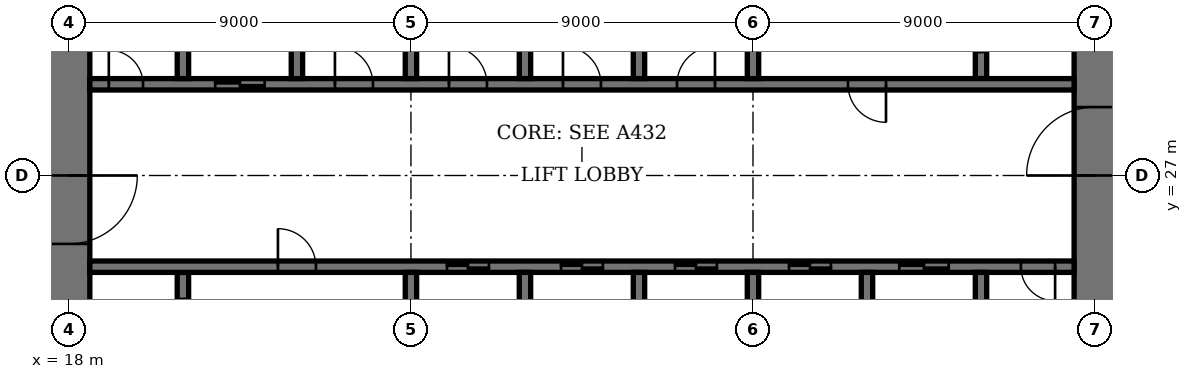
"""IFC4 building model, lengths in metres.
Left out: names, types, materials, properties, quantities, classifications, styles, units other than length and angle.
Written with IfcOpenShell. Run it as: python <this file> out.ifc"""

import sys

from ifc_helpers import new_model, si_unit, direction, frame, frame_2d, origin, place, context, subcontext, project, spatial, rectangle, extrude, element, fill, save


model = new_model("IFC4")
c1 = context("Model", 3, precision=1e-05, world=origin(), true_north=direction((0.0, 1.0)))
c2 = subcontext(c1, "Body", "Model", "MODEL_VIEW")
j1 = project(units=[si_unit("LENGTHUNIT", "METRE"), si_unit("PLANEANGLEUNIT", "RADIAN")], contexts=[c1])
p1 = place(None, origin())
s1 = spatial("IfcSite", under=j1, at=p1, CompositionType="ELEMENT")
p2 = place(p1, origin())
s2 = spatial("IfcBuilding", under=s1, at=p2, CompositionType="ELEMENT")
p3 = place(p2, frame((0.0, 0.0, 275.4)))
s3 = spatial("IfcBuildingStorey", under=s2, at=p3, CompositionType="ELEMENT", Elevation=275.4)
p4 = place(p3, frame((18.0, 35.45, 0.0), z_axis=(0.0, 0.0, 1.0), x_axis=(0.0, -1.0, 0.0)))
e1 = element("IfcWall", 1, at=p4, inside=s3, PredefinedType="SHEAR", context=c2, shape_type="SweptSolid", body=[
    extrude(rectangle(XDim=16.9, YDim=1.1, at=frame_2d((8.45, 0.0))), origin(), (0.0, 0.0, 1.0), 4.0),
])
p5 = place(p4, frame((8.45, 0.0, 0.0)))
e2 = element("IfcOpeningElement", 2, at=p5, cuts=e1, PredefinedType="OPENING", context=c2, shape_type="SweptSolid", body=[
    extrude(rectangle(XDim=1.8, YDim=2.4, at=frame_2d((0.9, 1.2))), frame((0.0, 0.56, 0.0), z_axis=(0.0, -1.0, 0.0), x_axis=(1.0, 0.0, 0.0)), (0.0, 0.0, 1.0), 1.12),
])
p6 = place(p3, frame((45.0, 18.55, 0.0), z_axis=(0.0, 0.0, 1.0), x_axis=(0.0, 1.0, 0.0)))
e3 = element("IfcWall", 3, at=p6, inside=s3, PredefinedType="SHEAR", context=c2, shape_type="SweptSolid", body=[
    extrude(rectangle(XDim=16.9, YDim=1.1, at=frame_2d((8.45, 0.0))), origin(), (0.0, 0.0, 1.0), 4.0),
])
p7 = place(p6, frame((8.45, 0.0, 0.0)))
e4 = element("IfcOpeningElement", 4, at=p7, cuts=e3, PredefinedType="OPENING", context=c2, shape_type="SweptSolid", body=[
    extrude(rectangle(XDim=1.8, YDim=2.4, at=frame_2d((0.9, 1.2))), frame((0.0, 0.56, 0.0), z_axis=(0.0, -1.0, 0.0), x_axis=(1.0, 0.0, 0.0)), (0.0, 0.0, 1.0), 1.12),
])
p8 = place(p3, frame((21.0, 21.95, 0.0), z_axis=(0.0, 0.0, 1.0), x_axis=(0.0, 1.0, 0.0)))
e5 = element("IfcWall", 5, at=p8, inside=s3, PredefinedType="SHEAR", context=c2, shape_type="SweptSolid", body=[
    extrude(rectangle(XDim=2.5, YDim=0.3, at=frame_2d((1.25, 0.0))), origin(), (0.0, 0.0, 1.0), 4.0),
])
p9 = place(p8, frame((0.7, 0.0, 0.0)))
e6 = element("IfcOpeningElement", 6, at=p9, cuts=e5, PredefinedType="OPENING", context=c2, shape_type="SweptSolid", body=[
    extrude(rectangle(XDim=1.1, YDim=2.4, at=frame_2d((0.55, 1.2))), frame((0.0, 0.16, 0.0), z_axis=(0.0, -1.0, 0.0), x_axis=(1.0, 0.0, 0.0)), (0.0, 0.0, 1.0), 0.32),
])
p10 = place(p3, frame((42.0, 29.55, 0.0), z_axis=(0.0, 0.0, 1.0), x_axis=(0.0, 1.0, 0.0)))
e7 = element("IfcWall", 7, at=p10, inside=s3, PredefinedType="SHEAR", context=c2, shape_type="SweptSolid", body=[
    extrude(rectangle(XDim=2.5, YDim=0.3, at=frame_2d((1.25, 0.0))), origin(), (0.0, 0.0, 1.0), 4.0),
])
p11 = place(p10, frame((0.7, 0.0, 0.0)))
e8 = element("IfcOpeningElement", 8, at=p11, cuts=e7, PredefinedType="OPENING", context=c2, shape_type="SweptSolid", body=[
    extrude(rectangle(XDim=1.1, YDim=2.4, at=frame_2d((0.55, 1.2))), frame((0.0, 0.16, 0.0), z_axis=(0.0, -1.0, 0.0), x_axis=(1.0, 0.0, 0.0)), (0.0, 0.0, 1.0), 0.32),
])
p12 = place(p3, frame((18.55, 24.6, 0.0), z_axis=(0.0, 0.0, 1.0), x_axis=(1.0, 0.0, 0.0)))
e9 = element("IfcWall", 9, at=p12, inside=s3, PredefinedType="SHEAR", context=c2, shape_type="SweptSolid", body=[
    extrude(rectangle(XDim=25.9, YDim=0.3, at=frame_2d((12.95, 0.0))), origin(), (0.0, 0.0, 1.0), 4.0),
])
p13 = place(p12, frame((4.95, 0.0, 0.0)))
e10 = element("IfcOpeningElement", 10, at=p13, cuts=e9, PredefinedType="OPENING", context=c2, shape_type="SweptSolid", body=[
    extrude(rectangle(XDim=1.0, YDim=2.4, at=frame_2d((0.5, 1.2))), frame((0.0, 0.16, 0.0), z_axis=(0.0, -1.0, 0.0), x_axis=(1.0, 0.0, 0.0)), (0.0, 0.0, 1.0), 0.32),
])
p14 = place(p12, frame((24.5, 0.0, 0.0)))
e11 = element("IfcOpeningElement", 11, at=p14, cuts=e9, PredefinedType="OPENING", context=c2, shape_type="SweptSolid", body=[
    extrude(rectangle(XDim=0.9, YDim=2.1, at=frame_2d((0.45, 1.05))), frame((0.0, 0.16, 0.0), z_axis=(0.0, -1.0, 0.0), x_axis=(1.0, 0.0, 0.0)), (0.0, 0.0, 1.0), 0.32),
])
p15 = place(p12, frame((9.4, 0.0, 0.0)))
e12 = element("IfcOpeningElement", 12, at=p15, cuts=e9, PredefinedType="OPENING", context=c2, shape_type="SweptSolid", body=[
    extrude(rectangle(XDim=1.1, YDim=2.4, at=frame_2d((0.55, 1.2))), frame((0.0, 0.16, 0.0), z_axis=(0.0, -1.0, 0.0), x_axis=(1.0, 0.0, 0.0)), (0.0, 0.0, 1.0), 0.32),
])
p16 = place(p12, frame((12.4, 0.0, 0.0)))
e13 = element("IfcOpeningElement", 13, at=p16, cuts=e9, PredefinedType="OPENING", context=c2, shape_type="SweptSolid", body=[
    extrude(rectangle(XDim=1.1, YDim=2.4, at=frame_2d((0.55, 1.2))), frame((0.0, 0.16, 0.0), z_axis=(0.0, -1.0, 0.0), x_axis=(1.0, 0.0, 0.0)), (0.0, 0.0, 1.0), 0.32),
])
p17 = place(p12, frame((15.4, 0.0, 0.0)))
e14 = element("IfcOpeningElement", 14, at=p17, cuts=e9, PredefinedType="OPENING", context=c2, shape_type="SweptSolid", body=[
    extrude(rectangle(XDim=1.1, YDim=2.4, at=frame_2d((0.55, 1.2))), frame((0.0, 0.16, 0.0), z_axis=(0.0, -1.0, 0.0), x_axis=(1.0, 0.0, 0.0)), (0.0, 0.0, 1.0), 0.32),
])
p18 = place(p12, frame((18.4, 0.0, 0.0)))
e15 = element("IfcOpeningElement", 15, at=p18, cuts=e9, PredefinedType="OPENING", context=c2, shape_type="SweptSolid", body=[
    extrude(rectangle(XDim=1.1, YDim=2.4, at=frame_2d((0.55, 1.2))), frame((0.0, 0.16, 0.0), z_axis=(0.0, -1.0, 0.0), x_axis=(1.0, 0.0, 0.0)), (0.0, 0.0, 1.0), 0.32),
])
p19 = place(p12, frame((21.3, 0.0, 0.0)))
e16 = element("IfcOpeningElement", 16, at=p19, cuts=e9, PredefinedType="OPENING", context=c2, shape_type="SweptSolid", body=[
    extrude(rectangle(XDim=1.3, YDim=2.4, at=frame_2d((0.65, 1.2))), frame((0.0, 0.16, 0.0), z_axis=(0.0, -1.0, 0.0), x_axis=(1.0, 0.0, 0.0)), (0.0, 0.0, 1.0), 0.32),
])
p20 = place(p3, frame((18.55, 29.4, 0.0), z_axis=(0.0, 0.0, 1.0), x_axis=(1.0, 0.0, 0.0)))
e17 = element("IfcWall", 17, at=p20, inside=s3, PredefinedType="SHEAR", context=c2, shape_type="SweptSolid", body=[
    extrude(rectangle(XDim=25.9, YDim=0.3, at=frame_2d((12.95, 0.0))), origin(), (0.0, 0.0, 1.0), 4.0),
])
p21 = place(p20, frame((19.95, 0.0, 0.0)))
e18 = element("IfcOpeningElement", 18, at=p21, cuts=e17, PredefinedType="OPENING", context=c2, shape_type="SweptSolid", body=[
    extrude(rectangle(XDim=1.0, YDim=2.4, at=frame_2d((0.5, 1.2))), frame((0.0, 0.16, 0.0), z_axis=(0.0, -1.0, 0.0), x_axis=(1.0, 0.0, 0.0)), (0.0, 0.0, 1.0), 0.32),
])
p22 = place(p20, frame((0.5, 0.0, 0.0)))
e19 = element("IfcOpeningElement", 19, at=p22, cuts=e17, PredefinedType="OPENING", context=c2, shape_type="SweptSolid", body=[
    extrude(rectangle(XDim=0.9, YDim=2.1, at=frame_2d((0.45, 1.05))), frame((0.0, 0.16, 0.0), z_axis=(0.0, -1.0, 0.0), x_axis=(1.0, 0.0, 0.0)), (0.0, 0.0, 1.0), 0.32),
])
p23 = place(p20, frame((15.45, 0.0, 0.0)))
e20 = element("IfcOpeningElement", 20, at=p23, cuts=e17, PredefinedType="OPENING", context=c2, shape_type="SweptSolid", body=[
    extrude(rectangle(XDim=1.0, YDim=2.4, at=frame_2d((0.5, 1.2))), frame((0.0, 0.16, 0.0), z_axis=(0.0, -1.0, 0.0), x_axis=(1.0, 0.0, 0.0)), (0.0, 0.0, 1.0), 0.32),
])
p24 = place(p20, frame((12.45, 0.0, 0.0)))
e21 = element("IfcOpeningElement", 21, at=p24, cuts=e17, PredefinedType="OPENING", context=c2, shape_type="SweptSolid", body=[
    extrude(rectangle(XDim=1.0, YDim=2.4, at=frame_2d((0.5, 1.2))), frame((0.0, 0.16, 0.0), z_axis=(0.0, -1.0, 0.0), x_axis=(1.0, 0.0, 0.0)), (0.0, 0.0, 1.0), 0.32),
])
p25 = place(p20, frame((9.45, 0.0, 0.0)))
e22 = element("IfcOpeningElement", 22, at=p25, cuts=e17, PredefinedType="OPENING", context=c2, shape_type="SweptSolid", body=[
    extrude(rectangle(XDim=1.0, YDim=2.4, at=frame_2d((0.5, 1.2))), frame((0.0, 0.16, 0.0), z_axis=(0.0, -1.0, 0.0), x_axis=(1.0, 0.0, 0.0)), (0.0, 0.0, 1.0), 0.32),
])
p26 = place(p20, frame((6.45, 0.0, 0.0)))
e23 = element("IfcOpeningElement", 23, at=p26, cuts=e17, PredefinedType="OPENING", context=c2, shape_type="SweptSolid", body=[
    extrude(rectangle(XDim=1.0, YDim=2.4, at=frame_2d((0.5, 1.2))), frame((0.0, 0.16, 0.0), z_axis=(0.0, -1.0, 0.0), x_axis=(1.0, 0.0, 0.0)), (0.0, 0.0, 1.0), 0.32),
])
p27 = place(p20, frame((3.3, 0.0, 0.0)))
e24 = element("IfcOpeningElement", 24, at=p27, cuts=e17, PredefinedType="OPENING", context=c2, shape_type="SweptSolid", body=[
    extrude(rectangle(XDim=1.3, YDim=2.4, at=frame_2d((0.65, 1.2))), frame((0.0, 0.16, 0.0), z_axis=(0.0, -1.0, 0.0), x_axis=(1.0, 0.0, 0.0)), (0.0, 0.0, 1.0), 0.32),
])
for number, where, z_axis, x_axis in (
    (25, (30.0, 21.75, 0.0), (0.0, 0.0, 1.0), (0.0, 1.0, 0.0)),
    (26, (33.0, 29.55, 0.0), (0.0, 0.0, 1.0), (0.0, 1.0, 0.0)),
    (27, (33.0, 21.75, 0.0), (0.0, 0.0, 1.0), (0.0, 1.0, 0.0)),
    (28, (30.0, 29.55, 0.0), (0.0, 0.0, 1.0), (0.0, 1.0, 0.0)),
    (29, (36.0, 21.75, 0.0), (0.0, 0.0, 1.0), (0.0, 1.0, 0.0)),
    (30, (27.0, 29.55, 0.0), (0.0, 0.0, 1.0), (0.0, 1.0, 0.0)),
):
    element("IfcWall", number, at=place(p3, frame(where, z_axis=z_axis, x_axis=x_axis)), inside=s3, PredefinedType="SHEAR", context=c2, shape_type="SweptSolid", body=[
        extrude(rectangle(XDim=2.7, YDim=0.3, at=frame_2d((1.35, 0.0))), origin(), (0.0, 0.0, 1.0), 4.0),
    ])
for number, where, z_axis, x_axis in (
    (31, (39.0, 18.55, 0.0), (0.0, 0.0, 1.0), (0.0, 1.0, 0.0)),
    (32, (24.0, 29.55, 0.0), (0.0, 0.0, 1.0), (0.0, 1.0, 0.0)),
):
    element("IfcWall", number, at=place(p3, frame(where, z_axis=z_axis, x_axis=x_axis)), inside=s3, PredefinedType="SHEAR", context=c2, shape_type="SweptSolid", body=[
        extrude(rectangle(XDim=5.9, YDim=0.3, at=frame_2d((2.95, 0.0))), origin(), (0.0, 0.0, 1.0), 4.0),
    ])
for number, where, z_axis, x_axis in (
    (33, (42.0, 21.75, 0.0), (0.0, 0.0, 1.0), (0.0, 1.0, 0.0)),
    (34, (21.0, 29.55, 0.0), (0.0, 0.0, 1.0), (0.0, 1.0, 0.0)),
):
    element("IfcWall", number, at=place(p3, frame(where, z_axis=z_axis, x_axis=x_axis)), inside=s3, PredefinedType="SHEAR", context=c2, shape_type="SweptSolid", body=[
        extrude(rectangle(XDim=2.7, YDim=0.3, at=frame_2d((1.35, 0.0))), origin(), (0.0, 0.0, 1.0), 4.0),
    ])
for number, where, z_axis, x_axis in (
    (35, (27.0, 21.6, 0.0), (0.0, 0.0, 1.0), (0.0, 1.0, 0.0)),
    (36, (36.0, 29.55, 0.0), (0.0, 0.0, 1.0), (0.0, 1.0, 0.0)),
):
    element("IfcWall", number, at=place(p3, frame(where, z_axis=z_axis, x_axis=x_axis)), inside=s3, PredefinedType="SHEAR", context=c2, shape_type="SweptSolid", body=[
        extrude(rectangle(XDim=2.85, YDim=0.3, at=frame_2d((1.425, 0.0))), origin(), (0.0, 0.0, 1.0), 4.0),
    ])
p28 = place(p5, origin())
e37 = element("IfcDoor", 37, at=p28, inside=s3, OperationType="DOUBLE_DOOR_DOUBLE_SWING", PredefinedType="DOOR", context=c2, shape_type="SweptSolid", body=[
    extrude(rectangle(XDim=1.8, YDim=2.4, at=frame_2d((0.9, 1.2))), frame((0.0, 0.03, 0.0), z_axis=(0.0, -1.0, 0.0), x_axis=(1.0, 0.0, 0.0)), (0.0, 0.0, 1.0), 0.06),
    extrude(rectangle(XDim=0.04, YDim=2.4, at=frame_2d((0.02, 1.2))), frame((0.0, 0.55, 0.0), z_axis=(0.0, -1.0, 0.0), x_axis=(1.0, 0.0, 0.0)), (0.0, 0.0, 1.0), 1.1),
    extrude(rectangle(XDim=0.04, YDim=2.4, at=frame_2d((1.78, 1.2))), frame((0.0, 0.55, 0.0), z_axis=(0.0, -1.0, 0.0), x_axis=(1.0, 0.0, 0.0)), (0.0, 0.0, 1.0), 1.1),
    extrude(rectangle(XDim=1.8, YDim=0.04, at=frame_2d((0.9, 2.38))), frame((0.0, 0.55, 0.0), z_axis=(0.0, -1.0, 0.0), x_axis=(1.0, 0.0, 0.0)), (0.0, 0.0, 1.0), 1.1),
])
fill(e2, e37)
p29 = place(p7, origin())
e38 = element("IfcDoor", 38, at=p29, inside=s3, OperationType="DOUBLE_DOOR_DOUBLE_SWING", PredefinedType="DOOR", context=c2, shape_type="SweptSolid", body=[
    extrude(rectangle(XDim=1.8, YDim=2.4, at=frame_2d((0.9, 1.2))), frame((0.0, 0.03, 0.0), z_axis=(0.0, -1.0, 0.0), x_axis=(1.0, 0.0, 0.0)), (0.0, 0.0, 1.0), 0.06),
    extrude(rectangle(XDim=0.04, YDim=2.4, at=frame_2d((0.02, 1.2))), frame((0.0, 0.55, 0.0), z_axis=(0.0, -1.0, 0.0), x_axis=(1.0, 0.0, 0.0)), (0.0, 0.0, 1.0), 1.1),
    extrude(rectangle(XDim=0.04, YDim=2.4, at=frame_2d((1.78, 1.2))), frame((0.0, 0.55, 0.0), z_axis=(0.0, -1.0, 0.0), x_axis=(1.0, 0.0, 0.0)), (0.0, 0.0, 1.0), 1.1),
    extrude(rectangle(XDim=1.8, YDim=0.04, at=frame_2d((0.9, 2.38))), frame((0.0, 0.55, 0.0), z_axis=(0.0, -1.0, 0.0), x_axis=(1.0, 0.0, 0.0)), (0.0, 0.0, 1.0), 1.1),
])
fill(e4, e38)
p30 = place(p13, origin())
e39 = element("IfcDoor", 39, at=p30, inside=s3, OperationType="SINGLE_SWING_RIGHT", PredefinedType="DOOR", context=c2, shape_type="SweptSolid", body=[
    extrude(rectangle(XDim=1.0, YDim=2.4, at=frame_2d((0.5, 1.2))), frame((0.0, 0.03, 0.0), z_axis=(0.0, -1.0, 0.0), x_axis=(1.0, 0.0, 0.0)), (0.0, 0.0, 1.0), 0.06),
])
fill(e10, e39)
p31 = place(p21, origin())
e40 = element("IfcDoor", 40, at=p31, inside=s3, OperationType="SINGLE_SWING_RIGHT", PredefinedType="DOOR", context=c2, shape_type="SweptSolid", body=[
    extrude(rectangle(XDim=1.0, YDim=2.4, at=frame_2d((0.5, 1.2))), frame((0.0, 0.03, 0.0), z_axis=(0.0, -1.0, 0.0), x_axis=(1.0, 0.0, 0.0)), (0.0, 0.0, 1.0), 0.06),
])
fill(e18, e40)
p32 = place(p14, origin())
e41 = element("IfcDoor", 41, at=p32, inside=s3, OperationType="SINGLE_SWING_RIGHT", PredefinedType="DOOR", context=c2, shape_type="SweptSolid", body=[
    extrude(rectangle(XDim=0.9, YDim=2.1, at=frame_2d((0.45, 1.05))), frame((0.0, 0.03, 0.0), z_axis=(0.0, -1.0, 0.0), x_axis=(1.0, 0.0, 0.0)), (0.0, 0.0, 1.0), 0.06),
])
fill(e11, e41)
p33 = place(p22, origin())
e42 = element("IfcDoor", 42, at=p33, inside=s3, OperationType="SINGLE_SWING_RIGHT", PredefinedType="DOOR", context=c2, shape_type="SweptSolid", body=[
    extrude(rectangle(XDim=0.9, YDim=2.1, at=frame_2d((0.45, 1.05))), frame((0.0, 0.03, 0.0), z_axis=(0.0, -1.0, 0.0), x_axis=(1.0, 0.0, 0.0)), (0.0, 0.0, 1.0), 0.06),
])
fill(e19, e42)
p34 = place(p15, origin())
e43 = element("IfcDoor", 43, at=p34, inside=s3, OperationType="DOUBLE_DOOR_SLIDING", PredefinedType="DOOR", context=c2, shape_type="SweptSolid", body=[
    extrude(rectangle(XDim=1.1, YDim=2.4, at=frame_2d((0.55, 1.2))), frame((0.0, 0.02, 0.0), z_axis=(0.0, -1.0, 0.0), x_axis=(1.0, 0.0, 0.0)), (0.0, 0.0, 1.0), 0.04),
])
fill(e12, e43)
p35 = place(p16, origin())
e44 = element("IfcDoor", 44, at=p35, inside=s3, OperationType="DOUBLE_DOOR_SLIDING", PredefinedType="DOOR", context=c2, shape_type="SweptSolid", body=[
    extrude(rectangle(XDim=1.1, YDim=2.4, at=frame_2d((0.55, 1.2))), frame((0.0, 0.02, 0.0), z_axis=(0.0, -1.0, 0.0), x_axis=(1.0, 0.0, 0.0)), (0.0, 0.0, 1.0), 0.04),
])
fill(e13, e44)
p36 = place(p17, origin())
e45 = element("IfcDoor", 45, at=p36, inside=s3, OperationType="DOUBLE_DOOR_SLIDING", PredefinedType="DOOR", context=c2, shape_type="SweptSolid", body=[
    extrude(rectangle(XDim=1.1, YDim=2.4, at=frame_2d((0.55, 1.2))), frame((0.0, 0.02, 0.0), z_axis=(0.0, -1.0, 0.0), x_axis=(1.0, 0.0, 0.0)), (0.0, 0.0, 1.0), 0.04),
])
fill(e14, e45)
p37 = place(p18, origin())
e46 = element("IfcDoor", 46, at=p37, inside=s3, OperationType="DOUBLE_DOOR_SLIDING", PredefinedType="DOOR", context=c2, shape_type="SweptSolid", body=[
    extrude(rectangle(XDim=1.1, YDim=2.4, at=frame_2d((0.55, 1.2))), frame((0.0, 0.02, 0.0), z_axis=(0.0, -1.0, 0.0), x_axis=(1.0, 0.0, 0.0)), (0.0, 0.0, 1.0), 0.04),
])
fill(e15, e46)
p38 = place(p23, origin())
e47 = element("IfcDoor", 47, at=p38, inside=s3, OperationType="SINGLE_SWING_LEFT", PredefinedType="DOOR", context=c2, shape_type="SweptSolid", body=[
    extrude(rectangle(XDim=1.0, YDim=2.4, at=frame_2d((0.5, 1.2))), frame((0.0, 0.03, 0.0), z_axis=(0.0, -1.0, 0.0), x_axis=(1.0, 0.0, 0.0)), (0.0, 0.0, 1.0), 0.06),
])
fill(e20, e47)
p39 = place(p24, origin())
e48 = element("IfcDoor", 48, at=p39, inside=s3, OperationType="SINGLE_SWING_RIGHT", PredefinedType="DOOR", context=c2, shape_type="SweptSolid", body=[
    extrude(rectangle(XDim=1.0, YDim=2.4, at=frame_2d((0.5, 1.2))), frame((0.0, 0.03, 0.0), z_axis=(0.0, -1.0, 0.0), x_axis=(1.0, 0.0, 0.0)), (0.0, 0.0, 1.0), 0.06),
])
fill(e21, e48)
p40 = place(p25, origin())
e49 = element("IfcDoor", 49, at=p40, inside=s3, OperationType="SINGLE_SWING_RIGHT", PredefinedType="DOOR", context=c2, shape_type="SweptSolid", body=[
    extrude(rectangle(XDim=1.0, YDim=2.4, at=frame_2d((0.5, 1.2))), frame((0.0, 0.03, 0.0), z_axis=(0.0, -1.0, 0.0), x_axis=(1.0, 0.0, 0.0)), (0.0, 0.0, 1.0), 0.06),
])
fill(e22, e49)
p41 = place(p26, origin())
e50 = element("IfcDoor", 50, at=p41, inside=s3, OperationType="SINGLE_SWING_RIGHT", PredefinedType="DOOR", context=c2, shape_type="SweptSolid", body=[
    extrude(rectangle(XDim=1.0, YDim=2.4, at=frame_2d((0.5, 1.2))), frame((0.0, 0.03, 0.0), z_axis=(0.0, -1.0, 0.0), x_axis=(1.0, 0.0, 0.0)), (0.0, 0.0, 1.0), 0.06),
])
fill(e23, e50)
p42 = place(p19, origin())
e51 = element("IfcDoor", 51, at=p42, inside=s3, OperationType="DOUBLE_DOOR_SLIDING", PredefinedType="DOOR", context=c2, shape_type="SweptSolid", body=[
    extrude(rectangle(XDim=1.3, YDim=2.4, at=frame_2d((0.65, 1.2))), frame((0.0, 0.02, 0.0), z_axis=(0.0, -1.0, 0.0), x_axis=(1.0, 0.0, 0.0)), (0.0, 0.0, 1.0), 0.04),
])
fill(e16, e51)
p43 = place(p27, origin())
e52 = element("IfcDoor", 52, at=p43, inside=s3, OperationType="DOUBLE_DOOR_SLIDING", PredefinedType="DOOR", context=c2, shape_type="SweptSolid", body=[
    extrude(rectangle(XDim=1.3, YDim=2.4, at=frame_2d((0.65, 1.2))), frame((0.0, 0.02, 0.0), z_axis=(0.0, -1.0, 0.0), x_axis=(1.0, 0.0, 0.0)), (0.0, 0.0, 1.0), 0.04),
])
fill(e24, e52)
save(model, sys.argv[1])
